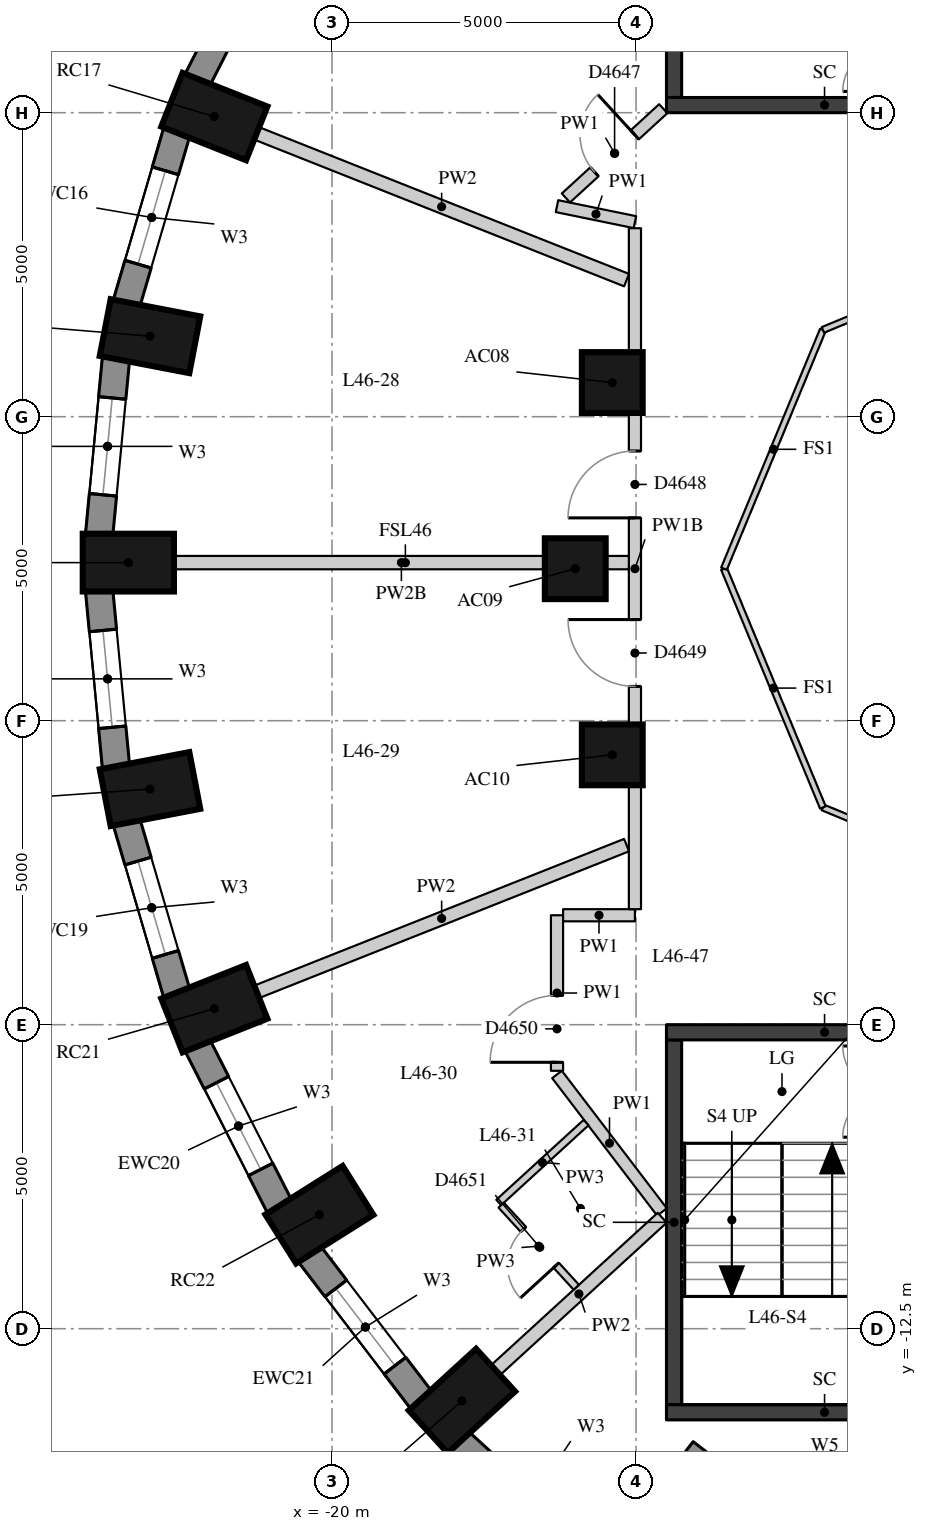
"""IFC4 building model, lengths in metres.
Left out: names, types, materials, properties, quantities, classifications, styles, units other than length and angle.
Written with IfcOpenShell. Run it as: python <this file> out.ifc"""

import sys

from ifc_helpers import new_model, si_unit, direction, frame, frame_2d, origin, origin_2d, place, context, subcontext, project, spatial, rectangle, extrude, element, fill, save


model = new_model("IFC4")
c1 = context("Model", 3, precision=1e-05, world=origin(), true_north=direction((0.0, 1.0)))
c2 = subcontext(c1, "Body", "Model", "MODEL_VIEW")
j1 = project(units=[si_unit("LENGTHUNIT", "METRE"), si_unit("PLANEANGLEUNIT", "RADIAN")], contexts=[c1])
p1 = place(None, origin())
s1 = spatial("IfcSite", under=j1, at=p1, CompositionType="ELEMENT")
p2 = place(p1, origin())
s2 = spatial("IfcBuilding", under=s1, at=p2, CompositionType="ELEMENT")
p3 = place(p2, frame((0.0, 0.0, 164.9)))
s3 = spatial("IfcBuildingStorey", under=s2, at=p3, CompositionType="ELEMENT", Elevation=164.9)
for number, where, z_axis, x_axis in (
    (1, (-21.936, 7.436, 0.0), (0.0, 0.0, 1.0), (-0.93, 0.369, 0.0)),
    (2, (-22.994, 3.825, 0.0), (0.0, 0.0, 1.0), (-0.982, 0.189, 0.0)),
    (3, (-23.35, 0.1, 0.0), (0.0, 0.0, 1.0), (-1.0, 0.0, 0.0)),
    (4, (-22.994, -3.625, 0.0), (0.0, 0.0, 1.0), (-0.982, -0.189, 0.0)),
    (5, (-21.936, -7.236, 0.0), (0.0, 0.0, 1.0), (-0.93, -0.369, 0.0)),
    (6, (-20.208, -10.625, 0.0), (0.0, 0.0, 1.0), (-0.846, -0.533, 0.0)),
    (7, (-17.864, -13.688, 0.0), (0.0, 0.0, 1.0), (-0.738, -0.675, 0.0)),
):
    element("IfcColumn", number, at=place(p3, frame(where, z_axis=z_axis, x_axis=x_axis)), inside=s3, PredefinedType="COLUMN", context=c2, shape_type="SweptSolid", body=[
        extrude(rectangle(XDim=1.5, YDim=0.95, at=origin_2d()), origin(), (0.0, 0.0, 1.0), 3.3),
    ])
for number, where, z_axis, x_axis in (
    (8, (-15.391, 3.062, 0.0), (0.0, 0.0, 1.0), (1.0, 0.0, 0.0)),
    (9, (-16.0, 0.0, 0.0), (0.0, 0.0, 1.0), (1.0, 0.0, 0.0)),
    (10, (-15.391, -3.062, 0.0), (0.0, 0.0, 1.0), (1.0, 0.0, 0.0)),
):
    element("IfcColumn", number, at=place(p3, frame(where, z_axis=z_axis, x_axis=x_axis)), inside=s3, PredefinedType="COLUMN", context=c2, shape_type="SweptSolid", body=[
        extrude(rectangle(XDim=1.0, YDim=1.0, at=origin_2d()), origin(), (0.0, 0.0, 1.0), 3.3),
    ])
p4 = place(p3, frame((-20.859, 10.697, 0.0), z_axis=(0.0, 0.0, 1.0), x_axis=(-0.454133999889, -0.890933392653, 0.0)))
e11 = element("IfcWall", 11, at=p4, inside=s3, PredefinedType="SOLIDWALL", context=c2, shape_type="SweptSolid", body=[
    extrude(rectangle(XDim=2.986, YDim=0.45, at=frame_2d((1.493, 0.0))), origin(), (0.0, 0.0, 1.0), 3.02),
])
p5 = place(p4, frame((0.693, 0.0, 0.4)))
e12 = element("IfcOpeningElement", 12, at=p5, cuts=e11, PredefinedType="OPENING", context=c2, shape_type="SweptSolid", body=[
    extrude(rectangle(XDim=1.6, YDim=1.75, at=frame_2d((0.8, 0.875))), frame((0.0, 0.235, 0.0), z_axis=(0.0, -1.0, 0.0), x_axis=(1.0, 0.0, 0.0)), (0.0, 0.0, 1.0), 0.47),
])
p6 = place(p3, frame((-22.551, 7.191, 0.0), z_axis=(0.0, 0.0, 1.0), x_axis=(-0.281125768296, -0.959670934435, 0.0)))
e13 = element("IfcWall", 13, at=p6, inside=s3, PredefinedType="SOLIDWALL", context=c2, shape_type="SweptSolid", body=[
    extrude(rectangle(XDim=2.948, YDim=0.45, at=frame_2d((1.474, 0.0))), origin(), (0.0, 0.0, 1.0), 3.02),
])
p7 = place(p6, frame((0.674, 0.0, 0.4)))
e14 = element("IfcOpeningElement", 14, at=p7, cuts=e13, PredefinedType="OPENING", context=c2, shape_type="SweptSolid", body=[
    extrude(rectangle(XDim=1.6, YDim=1.75, at=frame_2d((0.8, 0.875))), frame((0.0, 0.235, 0.0), z_axis=(0.0, -1.0, 0.0), x_axis=(1.0, 0.0, 0.0)), (0.0, 0.0, 1.0), 0.47),
])
p8 = place(p3, frame((-23.552, 3.469, 0.0), z_axis=(0.0, 0.0, 1.0), x_axis=(-0.095265737322, -0.995451876935, 0.0)))
e15 = element("IfcWall", 15, at=p8, inside=s3, PredefinedType="SOLIDWALL", context=c2, shape_type="SweptSolid", body=[
    extrude(rectangle(XDim=2.927, YDim=0.45, at=frame_2d((1.463, 0.0))), origin(), (0.0, 0.0, 1.0), 3.02),
])
p9 = place(p8, frame((0.663, 0.0, 0.4)))
e16 = element("IfcOpeningElement", 16, at=p9, cuts=e15, PredefinedType="OPENING", context=c2, shape_type="SweptSolid", body=[
    extrude(rectangle(XDim=1.6, YDim=1.75, at=frame_2d((0.8, 0.875))), frame((0.0, 0.235, 0.0), z_axis=(0.0, -1.0, 0.0), x_axis=(1.0, 0.0, 0.0)), (0.0, 0.0, 1.0), 0.47),
])
p10 = place(p3, frame((-23.831, -0.355, 0.0), z_axis=(0.0, 0.0, 1.0), x_axis=(0.095257827044, -0.995452633924, 0.0)))
e17 = element("IfcWall", 17, at=p10, inside=s3, PredefinedType="SOLIDWALL", context=c2, shape_type="SweptSolid", body=[
    extrude(rectangle(XDim=2.927, YDim=0.45, at=frame_2d((1.463, 0.0))), origin(), (0.0, 0.0, 1.0), 3.02),
])
p11 = place(p10, frame((0.663, 0.0, 0.4)))
e18 = element("IfcOpeningElement", 18, at=p11, cuts=e17, PredefinedType="OPENING", context=c2, shape_type="SweptSolid", body=[
    extrude(rectangle(XDim=1.6, YDim=1.75, at=frame_2d((0.8, 0.875))), frame((0.0, 0.235, 0.0), z_axis=(0.0, -1.0, 0.0), x_axis=(1.0, 0.0, 0.0)), (0.0, 0.0, 1.0), 0.47),
])
p12 = place(p3, frame((-23.38, -4.162, 0.0), z_axis=(0.0, 0.0, 1.0), x_axis=(0.281125768296, -0.959670934435, 0.0)))
e19 = element("IfcWall", 19, at=p12, inside=s3, PredefinedType="SOLIDWALL", context=c2, shape_type="SweptSolid", body=[
    extrude(rectangle(XDim=2.948, YDim=0.45, at=frame_2d((1.474, 0.0))), origin(), (0.0, 0.0, 1.0), 3.02),
])
p13 = place(p12, frame((0.674, 0.0, 0.4)))
e20 = element("IfcOpeningElement", 20, at=p13, cuts=e19, PredefinedType="OPENING", context=c2, shape_type="SweptSolid", body=[
    extrude(rectangle(XDim=1.6, YDim=1.75, at=frame_2d((0.8, 0.875))), frame((0.0, 0.235, 0.0), z_axis=(0.0, -1.0, 0.0), x_axis=(1.0, 0.0, 0.0)), (0.0, 0.0, 1.0), 0.47),
])
p14 = place(p3, frame((-22.215, -7.837, 0.0), z_axis=(0.0, 0.0, 1.0), x_axis=(0.454133999889, -0.890933392653, 0.0)))
e21 = element("IfcWall", 21, at=p14, inside=s3, PredefinedType="SOLIDWALL", context=c2, shape_type="SweptSolid", body=[
    extrude(rectangle(XDim=2.986, YDim=0.45, at=frame_2d((1.493, 0.0))), origin(), (0.0, 0.0, 1.0), 3.02),
])
p15 = place(p14, frame((0.693, 0.0, 0.4)))
e22 = element("IfcOpeningElement", 22, at=p15, cuts=e21, PredefinedType="OPENING", context=c2, shape_type="SweptSolid", body=[
    extrude(rectangle(XDim=1.6, YDim=1.75, at=frame_2d((0.8, 0.875))), frame((0.0, 0.235, 0.0), z_axis=(0.0, -1.0, 0.0), x_axis=(1.0, 0.0, 0.0)), (0.0, 0.0, 1.0), 0.47),
])
p16 = place(p3, frame((-20.374, -11.267, 0.0), z_axis=(0.0, 0.0, 1.0), x_axis=(0.607817056371, -0.794077090706, 0.0)))
e23 = element("IfcWall", 23, at=p16, inside=s3, PredefinedType="SOLIDWALL", context=c2, shape_type="SweptSolid", body=[
    extrude(rectangle(XDim=3.037, YDim=0.45, at=frame_2d((1.519, 0.0))), origin(), (0.0, 0.0, 1.0), 3.02),
])
p17 = place(p16, frame((0.719, 0.0, 0.4)))
e24 = element("IfcOpeningElement", 24, at=p17, cuts=e23, PredefinedType="OPENING", context=c2, shape_type="SweptSolid", body=[
    extrude(rectangle(XDim=1.6, YDim=1.75, at=frame_2d((0.8, 0.875))), frame((0.0, 0.235, 0.0), z_axis=(0.0, -1.0, 0.0), x_axis=(1.0, 0.0, 0.0)), (0.0, 0.0, 1.0), 0.47),
])
p18 = place(p3, frame((-17.913, -14.35, 0.0), z_axis=(0.0, 0.0, 1.0), x_axis=(0.737808755941, -0.675009807082, 0.0)))
e25 = element("IfcWall", 25, at=p18, inside=s3, PredefinedType="SOLIDWALL", context=c2, shape_type="SweptSolid", body=[
    extrude(rectangle(XDim=3.094, YDim=0.45, at=frame_2d((1.547, 0.0))), origin(), (0.0, 0.0, 1.0), 3.02),
])
p19 = place(p18, frame((0.747, 0.0, 0.4)))
e26 = element("IfcOpeningElement", 26, at=p19, cuts=e25, PredefinedType="OPENING", context=c2, shape_type="SweptSolid", body=[
    extrude(rectangle(XDim=1.6, YDim=1.75, at=frame_2d((0.8, 0.875))), frame((0.0, 0.235, 0.0), z_axis=(0.0, -1.0, 0.0), x_axis=(1.0, 0.0, 0.0)), (0.0, 0.0, 1.0), 0.47),
])
p20 = place(p3, frame((-14.731, -15.597, 0.0), z_axis=(0.0, 0.0, 1.0), x_axis=(0.610007638158, 0.792395533423, 0.0)))
e27 = element("IfcWall", 27, at=p20, inside=s3, PredefinedType="SOLIDWALL", context=c2, shape_type="SweptSolid", body=[
    extrude(rectangle(XDim=1.391, YDim=0.45, at=frame_2d((0.695, 0.0))), origin(), (0.0, 0.0, 1.0), 2.57),
])
p21 = place(p3, frame((-14.375, 7.75, -0.28), z_axis=(0.0, 0.0, 1.0), x_axis=(0.0, 1.0, 0.0)))
e28 = element("IfcWall", 28, at=p21, inside=s3, PredefinedType="SHEAR", context=c2, shape_type="SweptSolid", body=[
    extrude(rectangle(XDim=6.0, YDim=0.25, at=frame_2d((3.0, 0.0))), origin(), (0.0, 0.0, 1.0), 3.3),
])
p22 = place(p3, frame((-14.5, 7.625, -0.28), z_axis=(0.0, 0.0, 1.0), x_axis=(1.0, 0.0, 0.0)))
e29 = element("IfcWall", 29, at=p22, inside=s3, PredefinedType="SHEAR", context=c2, shape_type="SweptSolid", body=[
    extrude(rectangle(XDim=5.2, YDim=0.25, at=frame_2d((2.6, 0.0))), origin(), (0.0, 0.0, 1.0), 3.3),
])
p23 = place(p3, frame((-14.375, -13.75, -0.28), z_axis=(0.0, 0.0, 1.0), x_axis=(0.0, 1.0, 0.0)))
e30 = element("IfcWall", 30, at=p23, inside=s3, PredefinedType="SHEAR", context=c2, shape_type="SweptSolid", body=[
    extrude(rectangle(XDim=6.0, YDim=0.25, at=frame_2d((3.0, 0.0))), origin(), (0.0, 0.0, 1.0), 3.3),
])
for number, where, z_axis, x_axis in (
    (31, (-14.5, -7.625, -0.28), (0.0, 0.0, 1.0), (1.0, 0.0, 0.0)),
    (32, (-14.5, -13.875, -0.28), (0.0, 0.0, 1.0), (1.0, 0.0, 0.0)),
):
    element("IfcWall", number, at=place(p3, frame(where, z_axis=z_axis, x_axis=x_axis)), inside=s3, PredefinedType="SHEAR", context=c2, shape_type="SweptSolid", body=[
        extrude(rectangle(XDim=5.2, YDim=0.25, at=frame_2d((2.6, 0.0))), origin(), (0.0, 0.0, 1.0), 3.3),
    ])
p24 = place(p3, frame((-15.019, 5.7, 0.0), z_axis=(0.0, 0.0, 1.0), x_axis=(-0.979555577822, 0.201173730785, 0.0)))
e33 = element("IfcWall", 33, at=p24, inside=s3, PredefinedType="PARTITIONING", context=c2, shape_type="SweptSolid", body=[
    extrude(rectangle(XDim=1.308, YDim=0.2, at=frame_2d((0.654, 0.0))), origin(), (0.0, 0.0, 1.0), 3.02),
])
p25 = place(p3, frame((-16.154, 6.097, 0.0), z_axis=(0.0, 0.0, 1.0), x_axis=(0.736958194284, 0.675938325498, 0.0)))
e34 = element("IfcWall", 34, at=p25, inside=s3, PredefinedType="PARTITIONING", context=c2, shape_type="SweptSolid", body=[
    extrude(rectangle(XDim=2.173, YDim=0.2, at=frame_2d((1.086, 0.0))), origin(), (0.0, 0.0, 1.0), 3.02),
])
p26 = place(p25, frame((0.636, 0.0, 0.0)))
e35 = element("IfcOpeningElement", 35, at=p26, cuts=e34, PredefinedType="OPENING", context=c2, shape_type="SweptSolid", body=[
    extrude(rectangle(XDim=0.9, YDim=2.1, at=frame_2d((0.45, 1.05))), frame((0.0, 0.11, 0.0), z_axis=(0.0, -1.0, 0.0), x_axis=(1.0, 0.0, 0.0)), (0.0, 0.0, 1.0), 0.22),
])
p27 = place(p3, frame((-14.574, -10.58, 0.0), z_axis=(0.0, 0.0, 1.0), x_axis=(-0.606733250298, 0.794905505694, 0.0)))
e36 = element("IfcWall", 36, at=p27, inside=s3, PredefinedType="PARTITIONING", context=c2, shape_type="SweptSolid", body=[
    extrude(rectangle(XDim=2.845, YDim=0.2, at=frame_2d((1.423, 0.0))), origin(), (0.0, 0.0, 1.0), 3.02),
])
p28 = place(p3, frame((-16.3, -8.258, 0.0), z_axis=(0.0, 0.0, 1.0), x_axis=(0.0, 1.0, 0.0)))
e37 = element("IfcWall", 37, at=p28, inside=s3, PredefinedType="PARTITIONING", context=c2, shape_type="SweptSolid", body=[
    extrude(rectangle(XDim=2.558, YDim=0.2, at=frame_2d((1.279, 0.0))), origin(), (0.0, 0.0, 1.0), 3.02),
])
p29 = place(p28, frame((0.14, 0.0, 0.0)))
e38 = element("IfcOpeningElement", 38, at=p29, cuts=e37, PredefinedType="OPENING", context=c2, shape_type="SweptSolid", body=[
    extrude(rectangle(XDim=1.1, YDim=2.1, at=frame_2d((0.55, 1.05))), frame((0.0, 0.11, 0.0), z_axis=(0.0, -1.0, 0.0), x_axis=(1.0, 0.0, 0.0)), (0.0, 0.0, 1.0), 0.22),
])
p30 = place(p3, frame((-16.2, -5.7, 0.0), z_axis=(0.0, 0.0, 1.0), x_axis=(1.0, 0.0, 0.0)))
e39 = element("IfcWall", 39, at=p30, inside=s3, PredefinedType="PARTITIONING", context=c2, shape_type="SweptSolid", body=[
    extrude(rectangle(XDim=1.181, YDim=0.2, at=frame_2d((0.591, 0.0))), origin(), (0.0, 0.0, 1.0), 3.02),
])
p31 = place(p3, frame((-15.019, -5.6, 0.0), z_axis=(0.0, 0.0, 1.0), x_axis=(0.0, 1.0, 0.0)))
e40 = element("IfcWall", 40, at=p31, inside=s3, PredefinedType="PARTITIONING", context=c2, shape_type="SweptSolid", body=[
    extrude(rectangle(XDim=11.2, YDim=0.2, at=frame_2d((5.6, 0.0))), origin(), (0.0, 0.0, 1.0), 2.52),
])
p32 = place(p31, frame((6.436, 0.0, 0.0)))
e41 = element("IfcOpeningElement", 41, at=p32, cuts=e40, PredefinedType="OPENING", context=c2, shape_type="SweptSolid", body=[
    extrude(rectangle(XDim=1.1, YDim=2.1, at=frame_2d((0.55, 1.05))), frame((0.0, 0.11, 0.0), z_axis=(0.0, -1.0, 0.0), x_axis=(1.0, 0.0, 0.0)), (0.0, 0.0, 1.0), 0.22),
])
p33 = place(p31, frame((3.663, 0.0, 0.0)))
e42 = element("IfcOpeningElement", 42, at=p33, cuts=e40, PredefinedType="OPENING", context=c2, shape_type="SweptSolid", body=[
    extrude(rectangle(XDim=1.1, YDim=2.1, at=frame_2d((0.55, 1.05))), frame((0.0, 0.11, 0.0), z_axis=(0.0, -1.0, 0.0), x_axis=(1.0, 0.0, 0.0)), (0.0, 0.0, 1.0), 0.22),
])
p34 = place(p3, frame((-21.239, 7.16, 0.0), z_axis=(0.0, 0.0, 1.0), x_axis=(0.929520145478, -0.368771337215, 0.0)))
e43 = element("IfcWall", 43, at=p34, inside=s3, PredefinedType="PARTITIONING", context=c2, shape_type="SweptSolid", body=[
    extrude(rectangle(XDim=6.544, YDim=0.22, at=frame_2d((3.272, 0.0))), origin(), (0.0, 0.0, 1.0), 3.02),
])
p35 = place(p3, frame((-22.6, 0.1, 0.0), z_axis=(0.0, 0.0, 1.0), x_axis=(1.0, 0.0, 0.0)))
e44 = element("IfcWall", 44, at=p35, inside=s3, PredefinedType="PARTITIONING", context=c2, shape_type="SweptSolid", body=[
    extrude(rectangle(XDim=7.481, YDim=0.22, at=frame_2d((3.741, 0.0))), origin(), (0.0, 0.0, 1.0), 2.57),
])
p36 = place(p3, frame((-21.239, -6.96, 0.0), z_axis=(0.0, 0.0, 1.0), x_axis=(0.929520145478, 0.368771337215, 0.0)))
e45 = element("IfcWall", 45, at=p36, inside=s3, PredefinedType="PARTITIONING", context=c2, shape_type="SweptSolid", body=[
    extrude(rectangle(XDim=6.544, YDim=0.22, at=frame_2d((3.272, 0.0))), origin(), (0.0, 0.0, 1.0), 3.02),
])
p37 = place(p3, frame((-17.31, -13.182, 0.0), z_axis=(0.0, 0.0, 1.0), x_axis=(0.737860436015, 0.674953314655, 0.0)))
e46 = element("IfcWall", 46, at=p37, inside=s3, PredefinedType="PARTITIONING", context=c2, shape_type="SweptSolid", body=[
    extrude(rectangle(XDim=3.714, YDim=0.22, at=frame_2d((1.857, 0.0))), origin(), (0.0, 0.0, 1.0), 3.02),
])
p38 = place(p3, frame((-15.822, -9.11, 0.0), z_axis=(0.0, 0.0, 1.0), x_axis=(-0.737882479632, -0.674929215734, 0.0)))
e47 = element("IfcWall", 47, at=p38, inside=s3, PredefinedType="PARTITIONING", context=c2, shape_type="SweptSolid", body=[
    extrude(rectangle(XDim=1.947, YDim=0.12, at=frame_2d((0.973, 0.0))), origin(), (0.0, 0.0, 1.0), 3.02),
])
p39 = place(p3, frame((-17.218, -10.468, 0.0), z_axis=(0.0, 0.0, 1.0), x_axis=(0.674920747044, -0.737890225717, 0.0)))
e48 = element("IfcWall", 48, at=p39, inside=s3, PredefinedType="PARTITIONING", context=c2, shape_type="SweptSolid", body=[
    extrude(rectangle(XDim=1.83, YDim=0.12, at=frame_2d((0.915, 0.0))), origin(), (0.0, 0.0, 1.0), 3.02),
])
p40 = place(p39, frame((0.54, 0.0, 0.0)))
e49 = element("IfcOpeningElement", 49, at=p40, cuts=e48, PredefinedType="OPENING", context=c2, shape_type="SweptSolid", body=[
    extrude(rectangle(XDim=0.8, YDim=2.1, at=frame_2d((0.4, 1.05))), frame((0.0, 0.07, 0.0), z_axis=(0.0, -1.0, 0.0), x_axis=(1.0, 0.0, 0.0)), (0.0, 0.0, 1.0), 0.14),
])
for number, where, z_axis, x_axis in (
    (50, (-8.0, -5.554, 0.0), (0.0, 0.0, 1.0), (-0.924, 0.383, 0.0)),
    (51, (-11.927, -3.927, 0.0), (0.0, 0.0, 1.0), (-0.383, 0.924, 0.0)),
    (52, (-13.554, 0.0, 0.0), (0.0, 0.0, 1.0), (0.383, 0.924, 0.0)),
    (53, (-11.927, 3.927, 0.0), (0.0, 0.0, 1.0), (0.924, 0.383, 0.0)),
):
    element("IfcWall", number, at=place(p3, frame(where, z_axis=z_axis, x_axis=x_axis)), inside=s3, PredefinedType="PARTITIONING", context=c2, shape_type="SweptSolid", body=[
        extrude(rectangle(XDim=4.251, YDim=0.1, at=frame_2d((2.125, 0.0))), origin(), (0.0, 0.0, 1.0), 3.02),
    ])
p41 = place(p7, origin())
e54 = element("IfcWindow", 54, at=p41, inside=s3, PartitioningType="SINGLE_PANEL", PredefinedType="WINDOW", context=c2, shape_type="SweptSolid", body=[
    extrude(rectangle(XDim=1.6, YDim=1.75, at=frame_2d((0.8, 0.875))), frame((0.0, 0.035, 0.0), z_axis=(0.0, -1.0, 0.0), x_axis=(1.0, 0.0, 0.0)), (0.0, 0.0, 1.0), 0.06),
])
fill(e14, e54)
p42 = place(p9, origin())
e55 = element("IfcWindow", 55, at=p42, inside=s3, PartitioningType="SINGLE_PANEL", PredefinedType="WINDOW", context=c2, shape_type="SweptSolid", body=[
    extrude(rectangle(XDim=1.6, YDim=1.75, at=frame_2d((0.8, 0.875))), frame((0.0, 0.035, 0.0), z_axis=(0.0, -1.0, 0.0), x_axis=(1.0, 0.0, 0.0)), (0.0, 0.0, 1.0), 0.06),
])
fill(e16, e55)
p43 = place(p11, origin())
e56 = element("IfcWindow", 56, at=p43, inside=s3, PartitioningType="SINGLE_PANEL", PredefinedType="WINDOW", context=c2, shape_type="SweptSolid", body=[
    extrude(rectangle(XDim=1.6, YDim=1.75, at=frame_2d((0.8, 0.875))), frame((0.0, 0.035, 0.0), z_axis=(0.0, -1.0, 0.0), x_axis=(1.0, 0.0, 0.0)), (0.0, 0.0, 1.0), 0.06),
])
fill(e18, e56)
p44 = place(p13, origin())
e57 = element("IfcWindow", 57, at=p44, inside=s3, PartitioningType="SINGLE_PANEL", PredefinedType="WINDOW", context=c2, shape_type="SweptSolid", body=[
    extrude(rectangle(XDim=1.6, YDim=1.75, at=frame_2d((0.8, 0.875))), frame((0.0, 0.035, 0.0), z_axis=(0.0, -1.0, 0.0), x_axis=(1.0, 0.0, 0.0)), (0.0, 0.0, 1.0), 0.06),
])
fill(e20, e57)
p45 = place(p15, origin())
e58 = element("IfcWindow", 58, at=p45, inside=s3, PartitioningType="SINGLE_PANEL", PredefinedType="WINDOW", context=c2, shape_type="SweptSolid", body=[
    extrude(rectangle(XDim=1.6, YDim=1.75, at=frame_2d((0.8, 0.875))), frame((0.0, 0.035, 0.0), z_axis=(0.0, -1.0, 0.0), x_axis=(1.0, 0.0, 0.0)), (0.0, 0.0, 1.0), 0.06),
])
fill(e22, e58)
p46 = place(p17, origin())
e59 = element("IfcWindow", 59, at=p46, inside=s3, PartitioningType="SINGLE_PANEL", PredefinedType="WINDOW", context=c2, shape_type="SweptSolid", body=[
    extrude(rectangle(XDim=1.6, YDim=1.75, at=frame_2d((0.8, 0.875))), frame((0.0, 0.035, 0.0), z_axis=(0.0, -1.0, 0.0), x_axis=(1.0, 0.0, 0.0)), (0.0, 0.0, 1.0), 0.06),
])
fill(e24, e59)
p47 = place(p26, origin())
e60 = element("IfcDoor", 60, at=p47, inside=s3, OperationType="SINGLE_SWING_RIGHT", PredefinedType="DOOR", context=c2, shape_type="SweptSolid", body=[
    extrude(rectangle(XDim=0.9, YDim=2.1, at=frame_2d((0.45, 1.05))), frame((0.0, 0.025, 0.0), z_axis=(0.0, -1.0, 0.0), x_axis=(1.0, 0.0, 0.0)), (0.0, 0.0, 1.0), 0.05),
])
fill(e35, e60)
p48 = place(p32, origin())
e61 = element("IfcDoor", 61, at=p48, inside=s3, OperationType="SINGLE_SWING_LEFT", PredefinedType="DOOR", context=c2, shape_type="SweptSolid", body=[
    extrude(rectangle(XDim=1.1, YDim=2.1, at=frame_2d((0.55, 1.05))), frame((0.0, 0.025, 0.0), z_axis=(0.0, -1.0, 0.0), x_axis=(1.0, 0.0, 0.0)), (0.0, 0.0, 1.0), 0.05),
])
fill(e41, e61)
p49 = place(p33, origin())
e62 = element("IfcDoor", 62, at=p49, inside=s3, OperationType="SINGLE_SWING_RIGHT", PredefinedType="DOOR", context=c2, shape_type="SweptSolid", body=[
    extrude(rectangle(XDim=1.1, YDim=2.1, at=frame_2d((0.55, 1.05))), frame((0.0, 0.025, 0.0), z_axis=(0.0, -1.0, 0.0), x_axis=(1.0, 0.0, 0.0)), (0.0, 0.0, 1.0), 0.05),
])
fill(e42, e62)
p50 = place(p29, origin())
e63 = element("IfcDoor", 63, at=p50, inside=s3, OperationType="SINGLE_SWING_LEFT", PredefinedType="DOOR", context=c2, shape_type="SweptSolid", body=[
    extrude(rectangle(XDim=1.1, YDim=2.1, at=frame_2d((0.55, 1.05))), frame((0.0, 0.025, 0.0), z_axis=(0.0, -1.0, 0.0), x_axis=(1.0, 0.0, 0.0)), (0.0, 0.0, 1.0), 0.05),
])
fill(e38, e63)
p51 = place(p40, origin())
e64 = element("IfcDoor", 64, at=p51, inside=s3, OperationType="SINGLE_SWING_LEFT", PredefinedType="DOOR", context=c2, shape_type="SweptSolid", body=[
    extrude(rectangle(XDim=0.8, YDim=2.1, at=frame_2d((0.4, 1.05))), frame((0.0, 0.025, 0.0), z_axis=(0.0, -1.0, 0.0), x_axis=(1.0, 0.0, 0.0)), (0.0, 0.0, 1.0), 0.05),
])
fill(e49, e64)
save(model, sys.argv[1])
